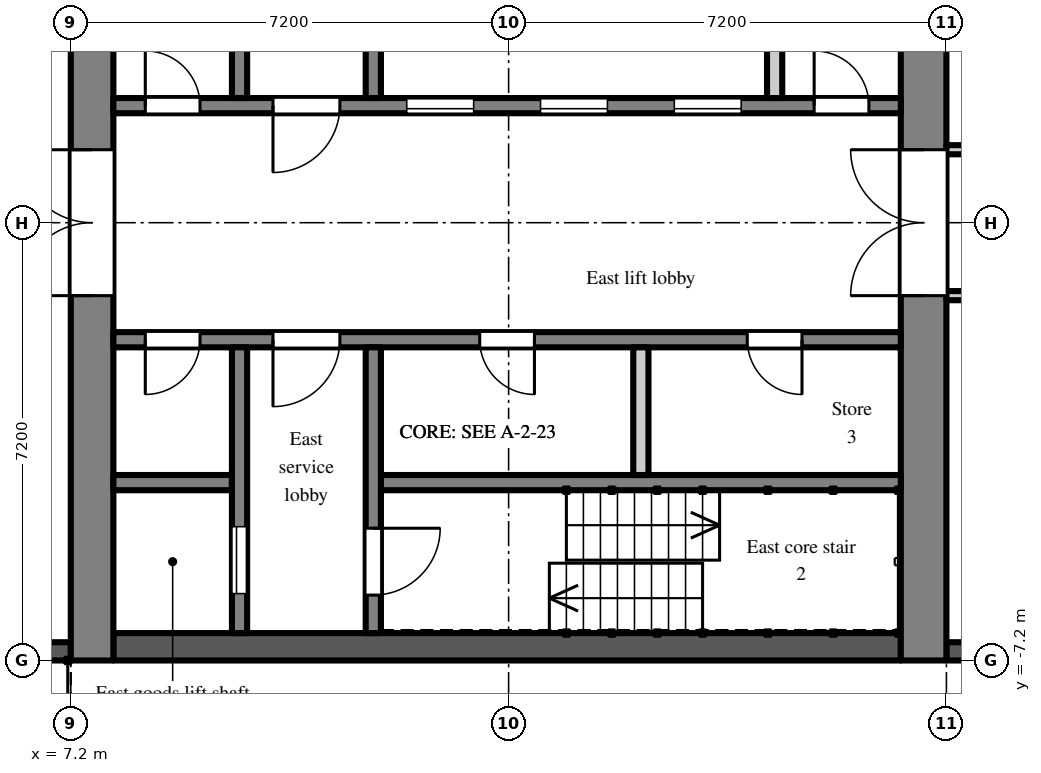
"""IFC4 building model, lengths in metres.
Left out: names, types, materials, properties, quantities, classifications, styles, units other than length and angle.
Written with IfcOpenShell. Run it as: python <this file> out.ifc"""

import sys

from ifc_helpers import new_model, si_unit, direction, frame, frame_2d, origin, place, context, subcontext, project, spatial, rectangle, extrude, element, fill, save


model = new_model("IFC4")
c1 = context("Model", 3, precision=1e-05, world=origin(), true_north=direction((0.0, 1.0)))
c2 = subcontext(c1, "Body", "Model", "MODEL_VIEW")
j1 = project(units=[si_unit("LENGTHUNIT", "METRE"), si_unit("PLANEANGLEUNIT", "RADIAN")], contexts=[c1])
p1 = place(None, origin())
s1 = spatial("IfcSite", under=j1, at=p1, CompositionType="ELEMENT")
p2 = place(p1, origin())
s2 = spatial("IfcBuilding", under=s1, at=p2, CompositionType="ELEMENT")
p3 = place(p2, frame((0.0, 0.0, 138.3)))
s3 = spatial("IfcBuildingStorey", under=s2, at=p3, CompositionType="ELEMENT", Elevation=138.3)
p4 = place(p3, frame((21.6, -7.05, 0.0), z_axis=(0.0, 0.0, 1.0), x_axis=(1.0, 0.0, 0.0)))
e1 = element("IfcWall", 1, at=p4, inside=s3, PredefinedType="SOLIDWALL", context=c2, shape_type="SweptSolid", body=[
    extrude(rectangle(XDim=2.7, YDim=0.3, at=frame_2d((1.35, 0.0))), origin(), (0.0, 0.0, 1.0), 2.2),
])
p5 = place(p3, frame((4.2, -7.05, 0.0), z_axis=(0.0, 0.0, 1.0), x_axis=(1.0, 0.0, 0.0)))
e2 = element("IfcWall", 2, at=p5, inside=s3, PredefinedType="SOLIDWALL", context=c2, shape_type="SweptSolid", body=[
    extrude(rectangle(XDim=3.0, YDim=0.3, at=frame_2d((1.5, 0.0))), origin(), (0.0, 0.0, 1.0), 2.2),
])
p6 = place(p3, frame((7.55, -7.2, 0.0), z_axis=(0.0, 0.0, 1.0), x_axis=(0.0, 1.0, 0.0)))
e3 = element("IfcWall", 3, at=p6, inside=s3, PredefinedType="SHEAR", context=c2, shape_type="SweptSolid", body=[
    extrude(rectangle(XDim=14.4, YDim=0.7, at=frame_2d((7.2, 0.0))), origin(), (0.0, 0.0, 1.0), 2.6),
])
p7 = place(p6, frame((6.0, 0.0, 0.0)))
e4 = element("IfcOpeningElement", 4, at=p7, cuts=e3, PredefinedType="OPENING", context=c2, shape_type="SweptSolid", body=[
    extrude(rectangle(XDim=2.4, YDim=2.2, at=frame_2d((1.2, 1.1))), frame((0.0, 0.36, 0.0), z_axis=(0.0, -1.0, 0.0), x_axis=(1.0, 0.0, 0.0)), (0.0, 0.0, 1.0), 0.72),
])
p8 = place(p3, frame((21.225, -7.2, 0.0), z_axis=(0.0, 0.0, 1.0), x_axis=(0.0, 1.0, 0.0)))
e5 = element("IfcWall", 5, at=p8, inside=s3, PredefinedType="SHEAR", context=c2, shape_type="SweptSolid", body=[
    extrude(rectangle(XDim=14.4, YDim=0.75, at=frame_2d((7.2, 0.0))), origin(), (0.0, 0.0, 1.0), 2.6),
])
p9 = place(p8, frame((6.0, 0.0, 0.0)))
e6 = element("IfcOpeningElement", 6, at=p9, cuts=e5, PredefinedType="OPENING", context=c2, shape_type="SweptSolid", body=[
    extrude(rectangle(XDim=2.4, YDim=2.2, at=frame_2d((1.2, 1.1))), frame((0.0, 0.385, 0.0), z_axis=(0.0, -1.0, 0.0), x_axis=(1.0, 0.0, 0.0)), (0.0, 0.0, 1.0), 0.77),
])
p10 = place(p3, frame((7.9, 1.925, 0.0), z_axis=(0.0, 0.0, 1.0), x_axis=(1.0, 0.0, 0.0)))
e7 = element("IfcWall", 7, at=p10, inside=s3, PredefinedType="SHEAR", context=c2, shape_type="SweptSolid", body=[
    extrude(rectangle(XDim=12.95, YDim=0.25, at=frame_2d((6.475, 0.0))), origin(), (0.0, 0.0, 1.0), 2.6),
])
p11 = place(p10, frame((4.825, 0.0, 0.0)))
e8 = element("IfcOpeningElement", 8, at=p11, cuts=e7, PredefinedType="OPENING", context=c2, shape_type="SweptSolid", body=[
    extrude(rectangle(XDim=1.1, YDim=2.1, at=frame_2d((0.55, 1.05))), frame((0.0, 0.135, 0.0), z_axis=(0.0, -1.0, 0.0), x_axis=(1.0, 0.0, 0.0)), (0.0, 0.0, 1.0), 0.27),
])
p12 = place(p10, frame((7.025, 0.0, 0.0)))
e9 = element("IfcOpeningElement", 9, at=p12, cuts=e7, PredefinedType="OPENING", context=c2, shape_type="SweptSolid", body=[
    extrude(rectangle(XDim=1.1, YDim=2.1, at=frame_2d((0.55, 1.05))), frame((0.0, 0.135, 0.0), z_axis=(0.0, -1.0, 0.0), x_axis=(1.0, 0.0, 0.0)), (0.0, 0.0, 1.0), 0.27),
])
p13 = place(p10, frame((9.225, 0.0, 0.0)))
e10 = element("IfcOpeningElement", 10, at=p13, cuts=e7, PredefinedType="OPENING", context=c2, shape_type="SweptSolid", body=[
    extrude(rectangle(XDim=1.1, YDim=2.1, at=frame_2d((0.55, 1.05))), frame((0.0, 0.135, 0.0), z_axis=(0.0, -1.0, 0.0), x_axis=(1.0, 0.0, 0.0)), (0.0, 0.0, 1.0), 0.27),
])
p14 = place(p10, frame((0.525, 0.0, 0.0)))
e11 = element("IfcOpeningElement", 11, at=p14, cuts=e7, PredefinedType="OPENING", context=c2, shape_type="SweptSolid", body=[
    extrude(rectangle(XDim=0.9, YDim=2.1, at=frame_2d((0.45, 1.05))), frame((0.0, 0.135, 0.0), z_axis=(0.0, -1.0, 0.0), x_axis=(1.0, 0.0, 0.0)), (0.0, 0.0, 1.0), 0.27),
])
p15 = place(p10, frame((2.625, 0.0, 0.0)))
e12 = element("IfcOpeningElement", 12, at=p15, cuts=e7, PredefinedType="OPENING", context=c2, shape_type="SweptSolid", body=[
    extrude(rectangle(XDim=1.1, YDim=2.1, at=frame_2d((0.55, 1.05))), frame((0.0, 0.135, 0.0), z_axis=(0.0, -1.0, 0.0), x_axis=(1.0, 0.0, 0.0)), (0.0, 0.0, 1.0), 0.27),
])
p16 = place(p10, frame((11.525, 0.0, 0.0)))
e13 = element("IfcOpeningElement", 13, at=p16, cuts=e7, PredefinedType="OPENING", context=c2, shape_type="SweptSolid", body=[
    extrude(rectangle(XDim=0.9, YDim=2.1, at=frame_2d((0.45, 1.05))), frame((0.0, 0.135, 0.0), z_axis=(0.0, -1.0, 0.0), x_axis=(1.0, 0.0, 0.0)), (0.0, 0.0, 1.0), 0.27),
])
p17 = place(p3, frame((9.975, 2.05, 0.0), z_axis=(0.0, 0.0, 1.0), x_axis=(0.0, 1.0, 0.0)))
e14 = element("IfcWall", 14, at=p17, inside=s3, PredefinedType="SHEAR", context=c2, shape_type="SweptSolid", body=[
    extrude(rectangle(XDim=4.7, YDim=0.25, at=frame_2d((2.35, 0.0))), origin(), (0.0, 0.0, 1.0), 2.6),
])
p18 = place(p17, frame((2.95, 0.0, 0.0)))
e15 = element("IfcOpeningElement", 15, at=p18, cuts=e14, PredefinedType="OPENING", context=c2, shape_type="SweptSolid", body=[
    extrude(rectangle(XDim=1.1, YDim=2.1, at=frame_2d((0.55, 1.05))), frame((0.0, 0.135, 0.0), z_axis=(0.0, -1.0, 0.0), x_axis=(1.0, 0.0, 0.0)), (0.0, 0.0, 1.0), 0.27),
])
p19 = place(p3, frame((12.175, 2.05, 0.0), z_axis=(0.0, 0.0, 1.0), x_axis=(0.0, 1.0, 0.0)))
e16 = element("IfcWall", 16, at=p19, inside=s3, PredefinedType="SHEAR", context=c2, shape_type="SweptSolid", body=[
    extrude(rectangle(XDim=4.7, YDim=0.25, at=frame_2d((2.35, 0.0))), origin(), (0.0, 0.0, 1.0), 2.6),
])
p20 = place(p19, frame((2.975, 0.0, 0.0)))
e17 = element("IfcOpeningElement", 17, at=p20, cuts=e16, PredefinedType="OPENING", context=c2, shape_type="SweptSolid", body=[
    extrude(rectangle(XDim=1.1, YDim=2.1, at=frame_2d((0.55, 1.05))), frame((0.0, 0.135, 0.0), z_axis=(0.0, -1.0, 0.0), x_axis=(1.0, 0.0, 0.0)), (0.0, 0.0, 1.0), 0.27),
])
p21 = place(p3, frame((18.775, 2.05, 0.0), z_axis=(0.0, 0.0, 1.0), x_axis=(0.0, 1.0, 0.0)))
e18 = element("IfcWall", 18, at=p21, inside=s3, PredefinedType="PARTITIONING", context=c2, shape_type="SweptSolid", body=[
    extrude(rectangle(XDim=2.1, YDim=0.25, at=frame_2d((1.05, 0.0))), origin(), (0.0, 0.0, 1.0), 2.6),
])
p22 = place(p3, frame((7.9, -6.975, 0.0), z_axis=(0.0, 0.0, 1.0), x_axis=(1.0, 0.0, 0.0)))
e19 = element("IfcWall", 19, at=p22, inside=s3, PredefinedType="SHEAR", context=c2, shape_type="SweptSolid", body=[
    extrude(rectangle(XDim=12.95, YDim=0.45, at=frame_2d((6.475, 0.0))), origin(), (0.0, 0.0, 1.0), 2.6),
])
p23 = place(p3, frame((7.9, -1.925, 0.0), z_axis=(0.0, 0.0, 1.0), x_axis=(1.0, 0.0, 0.0)))
e20 = element("IfcWall", 20, at=p23, inside=s3, PredefinedType="SHEAR", context=c2, shape_type="SweptSolid", body=[
    extrude(rectangle(XDim=12.95, YDim=0.25, at=frame_2d((6.475, 0.0))), origin(), (0.0, 0.0, 1.0), 2.6),
])
p24 = place(p23, frame((0.525, 0.0, 0.0)))
e21 = element("IfcOpeningElement", 21, at=p24, cuts=e20, PredefinedType="OPENING", context=c2, shape_type="SweptSolid", body=[
    extrude(rectangle(XDim=0.9, YDim=2.1, at=frame_2d((0.45, 1.05))), frame((0.0, 0.135, 0.0), z_axis=(0.0, -1.0, 0.0), x_axis=(1.0, 0.0, 0.0)), (0.0, 0.0, 1.0), 0.27),
])
p25 = place(p23, frame((2.625, 0.0, 0.0)))
e22 = element("IfcOpeningElement", 22, at=p25, cuts=e20, PredefinedType="OPENING", context=c2, shape_type="SweptSolid", body=[
    extrude(rectangle(XDim=1.1, YDim=2.1, at=frame_2d((0.55, 1.05))), frame((0.0, 0.135, 0.0), z_axis=(0.0, -1.0, 0.0), x_axis=(1.0, 0.0, 0.0)), (0.0, 0.0, 1.0), 0.27),
])
p26 = place(p23, frame((6.025, 0.0, 0.0)))
e23 = element("IfcOpeningElement", 23, at=p26, cuts=e20, PredefinedType="OPENING", context=c2, shape_type="SweptSolid", body=[
    extrude(rectangle(XDim=0.9, YDim=2.1, at=frame_2d((0.45, 1.05))), frame((0.0, 0.135, 0.0), z_axis=(0.0, -1.0, 0.0), x_axis=(1.0, 0.0, 0.0)), (0.0, 0.0, 1.0), 0.27),
])
p27 = place(p23, frame((10.425, 0.0, 0.0)))
e24 = element("IfcOpeningElement", 24, at=p27, cuts=e20, PredefinedType="OPENING", context=c2, shape_type="SweptSolid", body=[
    extrude(rectangle(XDim=0.9, YDim=2.1, at=frame_2d((0.45, 1.05))), frame((0.0, 0.135, 0.0), z_axis=(0.0, -1.0, 0.0), x_axis=(1.0, 0.0, 0.0)), (0.0, 0.0, 1.0), 0.27),
])
p28 = place(p3, frame((7.9, -4.275, 0.0), z_axis=(0.0, 0.0, 1.0), x_axis=(1.0, 0.0, 0.0)))
e25 = element("IfcWall", 25, at=p28, inside=s3, PredefinedType="SHEAR", context=c2, shape_type="SweptSolid", body=[
    extrude(rectangle(XDim=1.95, YDim=0.25, at=frame_2d((0.975, 0.0))), origin(), (0.0, 0.0, 1.0), 2.6),
])
p29 = place(p3, frame((12.3, -4.275, 0.0), z_axis=(0.0, 0.0, 1.0), x_axis=(1.0, 0.0, 0.0)))
e26 = element("IfcWall", 26, at=p29, inside=s3, PredefinedType="SHEAR", context=c2, shape_type="SweptSolid", body=[
    extrude(rectangle(XDim=8.55, YDim=0.25, at=frame_2d((4.275, 0.0))), origin(), (0.0, 0.0, 1.0), 2.6),
])
p30 = place(p3, frame((9.975, -2.05, 0.0), z_axis=(0.0, 0.0, 1.0), x_axis=(0.0, -1.0, 0.0)))
e27 = element("IfcWall", 27, at=p30, inside=s3, PredefinedType="SHEAR", context=c2, shape_type="SweptSolid", body=[
    extrude(rectangle(XDim=4.7, YDim=0.25, at=frame_2d((2.35, 0.0))), origin(), (0.0, 0.0, 1.0), 2.6),
])
p31 = place(p30, frame((2.95, 0.0, 0.0)))
e28 = element("IfcOpeningElement", 28, at=p31, cuts=e27, PredefinedType="OPENING", context=c2, shape_type="SweptSolid", body=[
    extrude(rectangle(XDim=1.1, YDim=2.1, at=frame_2d((0.55, 1.05))), frame((0.0, 0.135, 0.0), z_axis=(0.0, -1.0, 0.0), x_axis=(1.0, 0.0, 0.0)), (0.0, 0.0, 1.0), 0.27),
])
p32 = place(p3, frame((12.175, -2.05, 0.0), z_axis=(0.0, 0.0, 1.0), x_axis=(0.0, -1.0, 0.0)))
e29 = element("IfcWall", 29, at=p32, inside=s3, PredefinedType="SHEAR", context=c2, shape_type="SweptSolid", body=[
    extrude(rectangle(XDim=4.7, YDim=0.25, at=frame_2d((2.35, 0.0))), origin(), (0.0, 0.0, 1.0), 2.6),
])
p33 = place(p32, frame((2.975, 0.0, 0.0)))
e30 = element("IfcOpeningElement", 30, at=p33, cuts=e29, PredefinedType="OPENING", context=c2, shape_type="SweptSolid", body=[
    extrude(rectangle(XDim=1.1, YDim=2.1, at=frame_2d((0.55, 1.05))), frame((0.0, 0.135, 0.0), z_axis=(0.0, -1.0, 0.0), x_axis=(1.0, 0.0, 0.0)), (0.0, 0.0, 1.0), 0.27),
])
p34 = place(p3, frame((16.575, -2.05, 0.0), z_axis=(0.0, 0.0, 1.0), x_axis=(0.0, -1.0, 0.0)))
e31 = element("IfcWall", 31, at=p34, inside=s3, PredefinedType="PARTITIONING", context=c2, shape_type="SweptSolid", body=[
    extrude(rectangle(XDim=2.1, YDim=0.25, at=frame_2d((1.05, 0.0))), origin(), (0.0, 0.0, 1.0), 2.6),
])
p35 = place(p3, frame((21.6, -1.2, 0.0), z_axis=(0.0, 0.0, 1.0), x_axis=(1.0, 0.0, 0.0)))
e32 = element("IfcWall", 32, at=p35, inside=s3, PredefinedType="PARTITIONING", context=c2, shape_type="SweptSolid", body=[
    extrude(rectangle(XDim=14.9, YDim=0.15, at=frame_2d((7.45, 0.0))), origin(), (0.0, 0.0, 1.0), 2.6),
])
p36 = place(p35, frame((2.7, 0.0, 0.0)))
e33 = element("IfcOpeningElement", 33, at=p36, cuts=e32, PredefinedType="OPENING", context=c2, shape_type="SweptSolid", body=[
    extrude(rectangle(XDim=1.8, YDim=2.1, at=frame_2d((0.9, 1.05))), frame((0.0, 0.085, 0.0), z_axis=(0.0, -1.0, 0.0), x_axis=(1.0, 0.0, 0.0)), (0.0, 0.0, 1.0), 0.17),
])
p37 = place(p35, frame((8.55, 0.0, 0.0)))
e34 = element("IfcOpeningElement", 34, at=p37, cuts=e32, PredefinedType="OPENING", context=c2, shape_type="SweptSolid", body=[
    extrude(rectangle(XDim=0.9, YDim=2.1, at=frame_2d((0.45, 1.05))), frame((0.0, 0.085, 0.0), z_axis=(0.0, -1.0, 0.0), x_axis=(1.0, 0.0, 0.0)), (0.0, 0.0, 1.0), 0.17),
])
p38 = place(p35, frame((11.95, 0.0, 0.0)))
e35 = element("IfcOpeningElement", 35, at=p38, cuts=e32, PredefinedType="OPENING", context=c2, shape_type="SweptSolid", body=[
    extrude(rectangle(XDim=1.8, YDim=2.1, at=frame_2d((0.9, 1.05))), frame((0.0, 0.085, 0.0), z_axis=(0.0, -1.0, 0.0), x_axis=(1.0, 0.0, 0.0)), (0.0, 0.0, 1.0), 0.17),
])
p39 = place(p3, frame((21.6, 1.2, 0.0), z_axis=(0.0, 0.0, 1.0), x_axis=(1.0, 0.0, 0.0)))
e36 = element("IfcWall", 36, at=p39, inside=s3, PredefinedType="PARTITIONING", context=c2, shape_type="SweptSolid", body=[
    extrude(rectangle(XDim=14.9, YDim=0.15, at=frame_2d((7.45, 0.0))), origin(), (0.0, 0.0, 1.0), 2.6),
])
p40 = place(p39, frame((0.45, 0.0, 0.0)))
e37 = element("IfcOpeningElement", 37, at=p40, cuts=e36, PredefinedType="OPENING", context=c2, shape_type="SweptSolid", body=[
    extrude(rectangle(XDim=0.9, YDim=2.1, at=frame_2d((0.45, 1.05))), frame((0.0, 0.085, 0.0), z_axis=(0.0, -1.0, 0.0), x_axis=(1.0, 0.0, 0.0)), (0.0, 0.0, 1.0), 0.17),
])
p41 = place(p39, frame((2.25, 0.0, 0.0)))
e38 = element("IfcOpeningElement", 38, at=p41, cuts=e36, PredefinedType="OPENING", context=c2, shape_type="SweptSolid", body=[
    extrude(rectangle(XDim=0.9, YDim=2.1, at=frame_2d((0.45, 1.05))), frame((0.0, 0.085, 0.0), z_axis=(0.0, -1.0, 0.0), x_axis=(1.0, 0.0, 0.0)), (0.0, 0.0, 1.0), 0.17),
])
p42 = place(p39, frame((4.95, 0.0, 0.0)))
e39 = element("IfcOpeningElement", 39, at=p42, cuts=e36, PredefinedType="OPENING", context=c2, shape_type="SweptSolid", body=[
    extrude(rectangle(XDim=0.9, YDim=2.1, at=frame_2d((0.45, 1.05))), frame((0.0, 0.085, 0.0), z_axis=(0.0, -1.0, 0.0), x_axis=(1.0, 0.0, 0.0)), (0.0, 0.0, 1.0), 0.17),
])
p43 = place(p39, frame((7.8, 0.0, 0.0)))
e40 = element("IfcOpeningElement", 40, at=p43, cuts=e36, PredefinedType="OPENING", context=c2, shape_type="SweptSolid", body=[
    extrude(rectangle(XDim=1.0, YDim=2.1, at=frame_2d((0.5, 1.05))), frame((0.0, 0.085, 0.0), z_axis=(0.0, -1.0, 0.0), x_axis=(1.0, 0.0, 0.0)), (0.0, 0.0, 1.0), 0.17),
])
p44 = place(p39, frame((11.95, 0.0, 0.0)))
e41 = element("IfcOpeningElement", 41, at=p44, cuts=e36, PredefinedType="OPENING", context=c2, shape_type="SweptSolid", body=[
    extrude(rectangle(XDim=1.8, YDim=2.1, at=frame_2d((0.9, 1.05))), frame((0.0, 0.085, 0.0), z_axis=(0.0, -1.0, 0.0), x_axis=(1.0, 0.0, 0.0)), (0.0, 0.0, 1.0), 0.17),
])
p45 = place(p11, origin())
e42 = element("IfcDoor", 42, at=p45, inside=s3, OperationType="SLIDING_TO_LEFT", PredefinedType="DOOR", context=c2, shape_type="SweptSolid", body=[
    extrude(rectangle(XDim=1.1, YDim=2.1, at=frame_2d((0.55, 1.05))), frame((0.0, 0.025, 0.0), z_axis=(0.0, -1.0, 0.0), x_axis=(1.0, 0.0, 0.0)), (0.0, 0.0, 1.0), 0.05),
])
fill(e8, e42)
p46 = place(p12, origin())
e43 = element("IfcDoor", 43, at=p46, inside=s3, OperationType="SLIDING_TO_LEFT", PredefinedType="DOOR", context=c2, shape_type="SweptSolid", body=[
    extrude(rectangle(XDim=1.1, YDim=2.1, at=frame_2d((0.55, 1.05))), frame((0.0, 0.025, 0.0), z_axis=(0.0, -1.0, 0.0), x_axis=(1.0, 0.0, 0.0)), (0.0, 0.0, 1.0), 0.05),
])
fill(e9, e43)
p47 = place(p13, origin())
e44 = element("IfcDoor", 44, at=p47, inside=s3, OperationType="SLIDING_TO_LEFT", PredefinedType="DOOR", context=c2, shape_type="SweptSolid", body=[
    extrude(rectangle(XDim=1.1, YDim=2.1, at=frame_2d((0.55, 1.05))), frame((0.0, 0.025, 0.0), z_axis=(0.0, -1.0, 0.0), x_axis=(1.0, 0.0, 0.0)), (0.0, 0.0, 1.0), 0.05),
])
fill(e10, e44)
p48 = place(p31, origin())
e45 = element("IfcDoor", 45, at=p48, inside=s3, OperationType="SLIDING_TO_LEFT", PredefinedType="DOOR", context=c2, shape_type="SweptSolid", body=[
    extrude(rectangle(XDim=1.1, YDim=2.1, at=frame_2d((0.55, 1.05))), frame((0.0, 0.025, 0.0), z_axis=(0.0, -1.0, 0.0), x_axis=(1.0, 0.0, 0.0)), (0.0, 0.0, 1.0), 0.05),
])
fill(e28, e45)
p49 = place(p33, origin())
e46 = element("IfcDoor", 46, at=p49, inside=s3, OperationType="SINGLE_SWING_LEFT", PredefinedType="DOOR", context=c2, shape_type="SweptSolid", body=[
    extrude(rectangle(XDim=1.1, YDim=2.1, at=frame_2d((0.55, 1.05))), frame((0.0, 0.025, 0.0), z_axis=(0.0, -1.0, 0.0), x_axis=(1.0, 0.0, 0.0)), (0.0, 0.0, 1.0), 0.05),
])
fill(e30, e46)
p50 = place(p14, origin())
e47 = element("IfcDoor", 47, at=p50, inside=s3, OperationType="SINGLE_SWING_LEFT", PredefinedType="DOOR", context=c2, shape_type="SweptSolid", body=[
    extrude(rectangle(XDim=0.9, YDim=2.1, at=frame_2d((0.45, 1.05))), frame((0.0, 0.025, 0.0), z_axis=(0.0, -1.0, 0.0), x_axis=(1.0, 0.0, 0.0)), (0.0, 0.0, 1.0), 0.05),
])
fill(e11, e47)
p51 = place(p24, frame((0.9, 0.0, 0.0), z_axis=(0.0, 0.0, 1.0), x_axis=(-1.0, 0.0, 0.0)))
e48 = element("IfcDoor", 48, at=p51, inside=s3, OperationType="SINGLE_SWING_RIGHT", PredefinedType="DOOR", context=c2, shape_type="SweptSolid", body=[
    extrude(rectangle(XDim=0.9, YDim=2.1, at=frame_2d((0.45, 1.05))), frame((0.0, 0.025, 0.0), z_axis=(0.0, -1.0, 0.0), x_axis=(1.0, 0.0, 0.0)), (0.0, 0.0, 1.0), 0.05),
])
fill(e21, e48)
p52 = place(p15, frame((1.1, 0.0, 0.0), z_axis=(0.0, 0.0, 1.0), x_axis=(-1.0, 0.0, 0.0)))
e49 = element("IfcDoor", 49, at=p52, inside=s3, OperationType="SINGLE_SWING_RIGHT", PredefinedType="DOOR", context=c2, shape_type="SweptSolid", body=[
    extrude(rectangle(XDim=1.1, YDim=2.1, at=frame_2d((0.55, 1.05))), frame((0.0, 0.025, 0.0), z_axis=(0.0, -1.0, 0.0), x_axis=(1.0, 0.0, 0.0)), (0.0, 0.0, 1.0), 0.05),
])
fill(e12, e49)
p53 = place(p25, frame((1.1, 0.0, 0.0), z_axis=(0.0, 0.0, 1.0), x_axis=(-1.0, 0.0, 0.0)))
e50 = element("IfcDoor", 50, at=p53, inside=s3, OperationType="SINGLE_SWING_RIGHT", PredefinedType="DOOR", context=c2, shape_type="SweptSolid", body=[
    extrude(rectangle(XDim=1.1, YDim=2.1, at=frame_2d((0.55, 1.05))), frame((0.0, 0.025, 0.0), z_axis=(0.0, -1.0, 0.0), x_axis=(1.0, 0.0, 0.0)), (0.0, 0.0, 1.0), 0.05),
])
fill(e22, e50)
p54 = place(p7, origin())
e51 = element("IfcDoor", 51, at=p54, inside=s3, OperationType="DOUBLE_DOOR_DOUBLE_SWING", PredefinedType="DOOR", context=c2, shape_type="SweptSolid", body=[
    extrude(rectangle(XDim=2.4, YDim=2.2, at=frame_2d((1.2, 1.1))), frame((0.0, 0.025, 0.0), z_axis=(0.0, -1.0, 0.0), x_axis=(1.0, 0.0, 0.0)), (0.0, 0.0, 1.0), 0.05),
])
fill(e4, e51)
p55 = place(p9, origin())
e52 = element("IfcDoor", 52, at=p55, inside=s3, OperationType="DOUBLE_DOOR_DOUBLE_SWING", PredefinedType="DOOR", context=c2, shape_type="SweptSolid", body=[
    extrude(rectangle(XDim=2.4, YDim=2.2, at=frame_2d((1.2, 1.1))), frame((0.0, 0.025, 0.0), z_axis=(0.0, -1.0, 0.0), x_axis=(1.0, 0.0, 0.0)), (0.0, 0.0, 1.0), 0.05),
])
fill(e6, e52)
p56 = place(p16, origin())
e53 = element("IfcDoor", 53, at=p56, inside=s3, OperationType="SINGLE_SWING_LEFT", PredefinedType="DOOR", context=c2, shape_type="SweptSolid", body=[
    extrude(rectangle(XDim=0.9, YDim=2.1, at=frame_2d((0.45, 1.05))), frame((0.0, 0.025, 0.0), z_axis=(0.0, -1.0, 0.0), x_axis=(1.0, 0.0, 0.0)), (0.0, 0.0, 1.0), 0.05),
])
fill(e13, e53)
p57 = place(p26, frame((0.9, 0.0, 0.0), z_axis=(0.0, 0.0, 1.0), x_axis=(-1.0, 0.0, 0.0)))
e54 = element("IfcDoor", 54, at=p57, inside=s3, OperationType="SINGLE_SWING_LEFT", PredefinedType="DOOR", context=c2, shape_type="SweptSolid", body=[
    extrude(rectangle(XDim=0.9, YDim=2.1, at=frame_2d((0.45, 1.05))), frame((0.0, 0.025, 0.0), z_axis=(0.0, -1.0, 0.0), x_axis=(1.0, 0.0, 0.0)), (0.0, 0.0, 1.0), 0.05),
])
fill(e23, e54)
p58 = place(p27, frame((0.9, 0.0, 0.0), z_axis=(0.0, 0.0, 1.0), x_axis=(-1.0, 0.0, 0.0)))
e55 = element("IfcDoor", 55, at=p58, inside=s3, OperationType="SINGLE_SWING_LEFT", PredefinedType="DOOR", context=c2, shape_type="SweptSolid", body=[
    extrude(rectangle(XDim=0.9, YDim=2.1, at=frame_2d((0.45, 1.05))), frame((0.0, 0.025, 0.0), z_axis=(0.0, -1.0, 0.0), x_axis=(1.0, 0.0, 0.0)), (0.0, 0.0, 1.0), 0.05),
])
fill(e24, e55)
save(model, sys.argv[1])
